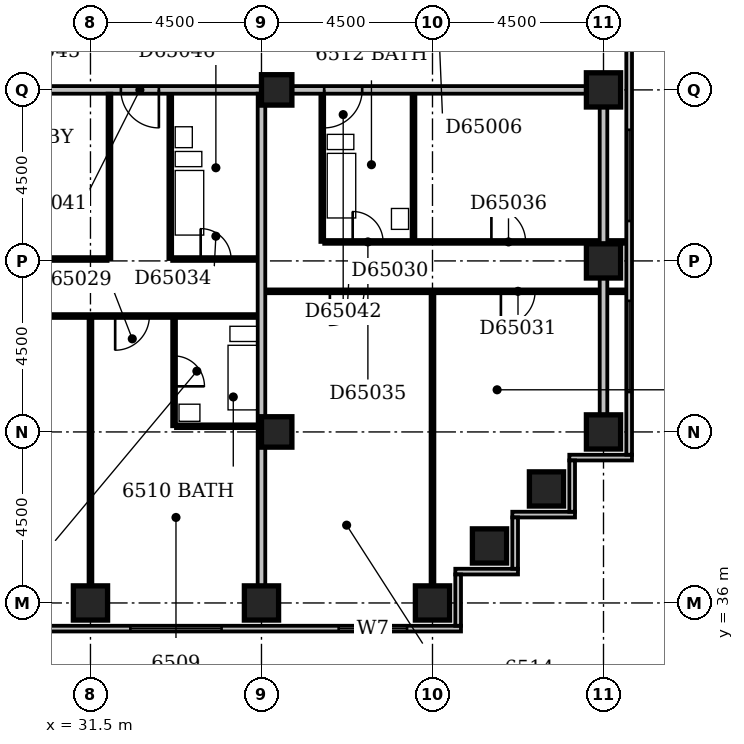
"""IFC4 building model, lengths in metres.
Left out: names, types, materials, properties, quantities, classifications, styles, units other than length and angle.
Written with IfcOpenShell. Run it as: python <this file> out.ifc"""

import sys

from ifc_helpers import new_model, si_unit, direction, frame, frame_2d, origin, origin_2d, place, context, subcontext, project, spatial, rectangle, extrude, element, fill, save


model = new_model("IFC4")
c1 = context("Model", 3, precision=1e-05, world=origin(), true_north=direction((0.0, 1.0)))
c2 = subcontext(c1, "Body", "Model", "MODEL_VIEW")
j1 = project(units=[si_unit("LENGTHUNIT", "METRE"), si_unit("PLANEANGLEUNIT", "RADIAN")], contexts=[c1])
p1 = place(None, origin())
s1 = spatial("IfcSite", under=j1, at=p1, CompositionType="ELEMENT")
p2 = place(p1, origin())
s2 = spatial("IfcBuilding", under=s1, at=p2, CompositionType="ELEMENT")
p3 = place(p2, frame((0.0, 0.0, 251.0)))
s3 = spatial("IfcBuildingStorey", under=s2, at=p3, CompositionType="ELEMENT", Elevation=251.0)
for number, where, z_axis, x_axis in (
    (1, (31.5, 36.0, -0.3), (0.0, 0.0, 1.0), (1.0, 0.0, 0.0)),
    (2, (36.0, 36.0, -0.3), (0.0, 0.0, 1.0), (1.0, 0.0, 0.0)),
    (3, (40.5, 36.0, -0.3), (0.0, 0.0, 1.0), (1.0, 0.0, 0.0)),
    (4, (42.0, 37.5, -0.3), (0.0, 0.0, 1.0), (1.0, 0.0, 0.0)),
    (5, (43.5, 39.0, -0.3), (0.0, 0.0, 1.0), (1.0, 0.0, 0.0)),
    (6, (45.0, 40.5, -0.3), (0.0, 0.0, 1.0), (1.0, 0.0, 0.0)),
    (7, (45.0, 45.0, -0.3), (0.0, 0.0, 1.0), (1.0, 0.0, 0.0)),
    (8, (45.0, 49.5, -0.3), (0.0, 0.0, 1.0), (1.0, 0.0, 0.0)),
):
    element("IfcColumn", number, at=place(p3, frame(where, z_axis=z_axis, x_axis=x_axis)), inside=s3, PredefinedType="COLUMN", context=c2, shape_type="SweptSolid", body=[
        extrude(rectangle(XDim=0.9, YDim=0.9, at=origin_2d()), origin(), (0.0, 0.0, 1.0), 3.6),
    ])
for number, where, z_axis, x_axis in (
    (9, (36.4, 40.5, -0.3), (0.0, 0.0, 1.0), (1.0, 0.0, 0.0)),
    (10, (36.4, 49.5, -0.3), (0.0, 0.0, 1.0), (1.0, 0.0, 0.0)),
):
    element("IfcColumn", number, at=place(p3, frame(where, z_axis=z_axis, x_axis=x_axis)), inside=s3, PredefinedType="COLUMN", context=c2, shape_type="SweptSolid", body=[
        extrude(rectangle(XDim=0.8, YDim=0.8, at=origin_2d()), origin(), (0.0, 0.0, 1.0), 3.6),
    ])
p4 = place(p3, frame((23.1, 35.325, 0.0), z_axis=(0.0, 0.0, 1.0), x_axis=(1.0, 0.0, 0.0)))
e11 = element("IfcWall", 11, at=p4, inside=s3, PredefinedType="STANDARD", context=c2, shape_type="SweptSolid", body=[
    extrude(rectangle(XDim=18.15, YDim=0.15, at=frame_2d((9.075, 0.0))), origin(), (0.0, 0.0, 1.0), 2.7),
])
p5 = place(p4, frame((0.45, 0.0, 0.6)))
e12 = element("IfcOpeningElement", 12, at=p5, cuts=e11, PredefinedType="OPENING", context=c2, shape_type="SweptSolid", body=[
    extrude(rectangle(XDim=2.4, YDim=1.8, at=frame_2d((1.2, 0.9))), frame((0.0, 0.087, 0.0), z_axis=(0.0, -1.0, 0.0), x_axis=(1.0, 0.0, 0.0)), (0.0, 0.0, 1.0), 0.174),
])
p6 = place(p4, frame((4.95, 0.0, 0.6)))
e13 = element("IfcOpeningElement", 13, at=p6, cuts=e11, PredefinedType="OPENING", context=c2, shape_type="SweptSolid", body=[
    extrude(rectangle(XDim=2.4, YDim=1.8, at=frame_2d((1.2, 0.9))), frame((0.0, 0.087, 0.0), z_axis=(0.0, -1.0, 0.0), x_axis=(1.0, 0.0, 0.0)), (0.0, 0.0, 1.0), 0.174),
])
p7 = place(p4, frame((9.45, 0.0, 0.6)))
e14 = element("IfcOpeningElement", 14, at=p7, cuts=e11, PredefinedType="OPENING", context=c2, shape_type="SweptSolid", body=[
    extrude(rectangle(XDim=2.4, YDim=1.8, at=frame_2d((1.2, 0.9))), frame((0.0, 0.087, 0.0), z_axis=(0.0, -1.0, 0.0), x_axis=(1.0, 0.0, 0.0)), (0.0, 0.0, 1.0), 0.174),
])
p8 = place(p4, frame((14.931, 0.0, 0.6)))
e15 = element("IfcOpeningElement", 15, at=p8, cuts=e11, PredefinedType="OPENING", context=c2, shape_type="SweptSolid", body=[
    extrude(rectangle(XDim=1.8, YDim=1.8, at=frame_2d((0.9, 0.9))), frame((0.0, 0.087, 0.0), z_axis=(0.0, -1.0, 0.0), x_axis=(1.0, 0.0, 0.0)), (0.0, 0.0, 1.0), 0.174),
])
p9 = place(p3, frame((41.175, 35.4, 0.0), z_axis=(0.0, 0.0, 1.0), x_axis=(0.0, 1.0, 0.0)))
e16 = element("IfcWall", 16, at=p9, inside=s3, PredefinedType="STANDARD", context=c2, shape_type="SweptSolid", body=[
    extrude(rectangle(XDim=1.35, YDim=0.15, at=frame_2d((0.675, 0.0))), origin(), (0.0, 0.0, 1.0), 2.7),
])
p10 = place(p3, frame((41.1, 36.825, 0.0), z_axis=(0.0, 0.0, 1.0), x_axis=(1.0, 0.0, 0.0)))
e17 = element("IfcWall", 17, at=p10, inside=s3, PredefinedType="STANDARD", context=c2, shape_type="SweptSolid", body=[
    extrude(rectangle(XDim=1.65, YDim=0.15, at=frame_2d((0.825, 0.0))), origin(), (0.0, 0.0, 1.0), 2.7),
])
p11 = place(p3, frame((42.675, 36.9, 0.0), z_axis=(0.0, 0.0, 1.0), x_axis=(0.0, 1.0, 0.0)))
e18 = element("IfcWall", 18, at=p11, inside=s3, PredefinedType="STANDARD", context=c2, shape_type="SweptSolid", body=[
    extrude(rectangle(XDim=1.35, YDim=0.15, at=frame_2d((0.675, 0.0))), origin(), (0.0, 0.0, 1.0), 2.7),
])
p12 = place(p3, frame((42.6, 38.325, 0.0), z_axis=(0.0, 0.0, 1.0), x_axis=(1.0, 0.0, 0.0)))
e19 = element("IfcWall", 19, at=p12, inside=s3, PredefinedType="STANDARD", context=c2, shape_type="SweptSolid", body=[
    extrude(rectangle(XDim=1.65, YDim=0.15, at=frame_2d((0.825, 0.0))), origin(), (0.0, 0.0, 1.0), 2.7),
])
p13 = place(p3, frame((44.175, 38.4, 0.0), z_axis=(0.0, 0.0, 1.0), x_axis=(0.0, 1.0, 0.0)))
e20 = element("IfcWall", 20, at=p13, inside=s3, PredefinedType="STANDARD", context=c2, shape_type="SweptSolid", body=[
    extrude(rectangle(XDim=1.35, YDim=0.15, at=frame_2d((0.675, 0.0))), origin(), (0.0, 0.0, 1.0), 2.7),
])
p14 = place(p3, frame((44.1, 39.825, 0.0), z_axis=(0.0, 0.0, 1.0), x_axis=(1.0, 0.0, 0.0)))
e21 = element("IfcWall", 21, at=p14, inside=s3, PredefinedType="STANDARD", context=c2, shape_type="SweptSolid", body=[
    extrude(rectangle(XDim=1.65, YDim=0.15, at=frame_2d((0.825, 0.0))), origin(), (0.0, 0.0, 1.0), 2.7),
])
p15 = place(p3, frame((45.675, 39.9, 0.0), z_axis=(0.0, 0.0, 1.0), x_axis=(0.0, 1.0, 0.0)))
e22 = element("IfcWall", 22, at=p15, inside=s3, PredefinedType="STANDARD", context=c2, shape_type="SweptSolid", body=[
    extrude(rectangle(XDim=19.35, YDim=0.15, at=frame_2d((9.675, 0.0))), origin(), (0.0, 0.0, 1.0), 2.7),
])
p16 = place(p15, frame((1.65, 0.0, 0.6)))
e23 = element("IfcOpeningElement", 23, at=p16, cuts=e22, PredefinedType="OPENING", context=c2, shape_type="SweptSolid", body=[
    extrude(rectangle(XDim=2.4, YDim=1.8, at=frame_2d((1.2, 0.9))), frame((0.0, 0.087, 0.0), z_axis=(0.0, -1.0, 0.0), x_axis=(1.0, 0.0, 0.0)), (0.0, 0.0, 1.0), 0.174),
])
p17 = place(p15, frame((6.15, 0.0, 0.6)))
e24 = element("IfcOpeningElement", 24, at=p17, cuts=e22, PredefinedType="OPENING", context=c2, shape_type="SweptSolid", body=[
    extrude(rectangle(XDim=2.4, YDim=1.8, at=frame_2d((1.2, 0.9))), frame((0.0, 0.087, 0.0), z_axis=(0.0, -1.0, 0.0), x_axis=(1.0, 0.0, 0.0)), (0.0, 0.0, 1.0), 0.174),
])
p18 = place(p3, frame((31.5, 36.45, 0.0), z_axis=(0.0, 0.0, 1.0), x_axis=(0.0, 1.0, 0.0)))
e25 = element("IfcWall", 25, at=p18, inside=s3, PredefinedType="PARTITIONING", context=c2, shape_type="SweptSolid", body=[
    extrude(rectangle(XDim=7.05, YDim=0.1, at=frame_2d((3.525, 0.0))), origin(), (0.0, 0.0, 1.0), 3.3),
])
p19 = place(p3, frame((36.0, 36.45, 0.0), z_axis=(0.0, 0.0, 1.0), x_axis=(0.0, 1.0, 0.0)))
e26 = element("IfcWall", 26, at=p19, inside=s3, PredefinedType="PARTITIONING", context=c2, shape_type="SweptSolid", body=[
    extrude(rectangle(XDim=12.95, YDim=0.2, at=frame_2d((6.475, 0.0))), origin(), (0.0, 0.0, 1.0), 3.3),
])
p20 = place(p3, frame((40.5, 36.45, 0.0), z_axis=(0.0, 0.0, 1.0), x_axis=(0.0, 1.0, 0.0)))
e27 = element("IfcWall", 27, at=p20, inside=s3, PredefinedType="PARTITIONING", context=c2, shape_type="SweptSolid", body=[
    extrude(rectangle(XDim=7.7, YDim=0.1, at=frame_2d((3.85, 0.0))), origin(), (0.0, 0.0, 1.0), 3.3),
])
p21 = place(p3, frame((33.7, 40.65, 0.0), z_axis=(0.0, 0.0, 1.0), x_axis=(0.0, 1.0, 0.0)))
e28 = element("IfcWall", 28, at=p21, inside=s3, PredefinedType="PLUMBINGWALL", context=c2, shape_type="SweptSolid", body=[
    extrude(rectangle(XDim=2.85, YDim=0.1, at=frame_2d((1.425, 0.0))), origin(), (0.0, 0.0, 1.0), 3.3),
])
p22 = place(p21, frame((1.05, 0.0, 0.0)))
e29 = element("IfcOpeningElement", 29, at=p22, cuts=e28, PredefinedType="OPENING", context=c2, shape_type="SweptSolid", body=[
    extrude(rectangle(XDim=0.8, YDim=2.1, at=frame_2d((0.4, 1.05))), frame((0.0, 0.062, 0.0), z_axis=(0.0, -1.0, 0.0), x_axis=(1.0, 0.0, 0.0)), (0.0, 0.0, 1.0), 0.124),
])
p23 = place(p3, frame((33.75, 40.65, 0.0), z_axis=(0.0, 0.0, 1.0), x_axis=(1.0, 0.0, 0.0)))
e30 = element("IfcWall", 30, at=p23, inside=s3, PredefinedType="PLUMBINGWALL", context=c2, shape_type="SweptSolid", body=[
    extrude(rectangle(XDim=2.15, YDim=0.1, at=frame_2d((1.075, 0.0))), origin(), (0.0, 0.0, 1.0), 3.3),
])
p24 = place(p3, frame((45.0, 40.95, 0.0), z_axis=(0.0, 0.0, 1.0), x_axis=(0.0, 1.0, 0.0)))
e31 = element("IfcWall", 31, at=p24, inside=s3, PredefinedType="PARTITIONING", context=c2, shape_type="SweptSolid", body=[
    extrude(rectangle(XDim=8.1, YDim=0.2, at=frame_2d((4.05, 0.0))), origin(), (0.0, 0.0, 1.0), 2.7),
])
p25 = place(p3, frame((27.1, 43.55, 0.0), z_axis=(0.0, 0.0, 1.0), x_axis=(1.0, 0.0, 0.0)))
e32 = element("IfcWall", 32, at=p25, inside=s3, PredefinedType="PARTITIONING", context=c2, shape_type="SweptSolid", body=[
    extrude(rectangle(XDim=8.8, YDim=0.1, at=frame_2d((4.4, 0.0))), origin(), (0.0, 0.0, 1.0), 3.3),
])
p26 = place(p25, frame((1.7, 0.0, 0.0)))
e33 = element("IfcOpeningElement", 33, at=p26, cuts=e32, PredefinedType="OPENING", context=c2, shape_type="SweptSolid", body=[
    extrude(rectangle(XDim=0.9, YDim=2.1, at=frame_2d((0.45, 1.05))), frame((0.0, 0.062, 0.0), z_axis=(0.0, -1.0, 0.0), x_axis=(1.0, 0.0, 0.0)), (0.0, 0.0, 1.0), 0.124),
])
p27 = place(p25, frame((5.05, 0.0, 0.0)))
e34 = element("IfcOpeningElement", 34, at=p27, cuts=e32, PredefinedType="OPENING", context=c2, shape_type="SweptSolid", body=[
    extrude(rectangle(XDim=0.9, YDim=2.1, at=frame_2d((0.45, 1.05))), frame((0.0, 0.062, 0.0), z_axis=(0.0, -1.0, 0.0), x_axis=(1.0, 0.0, 0.0)), (0.0, 0.0, 1.0), 0.124),
])
p28 = place(p3, frame((36.1, 44.2, 0.0), z_axis=(0.0, 0.0, 1.0), x_axis=(1.0, 0.0, 0.0)))
e35 = element("IfcWall", 35, at=p28, inside=s3, PredefinedType="PARTITIONING", context=c2, shape_type="SweptSolid", body=[
    extrude(rectangle(XDim=9.5, YDim=0.1, at=frame_2d((4.75, 0.0))), origin(), (0.0, 0.0, 1.0), 3.3),
])
p29 = place(p28, frame((1.7, 0.0, 0.0)))
e36 = element("IfcOpeningElement", 36, at=p29, cuts=e35, PredefinedType="OPENING", context=c2, shape_type="SweptSolid", body=[
    extrude(rectangle(XDim=0.9, YDim=2.1, at=frame_2d((0.45, 1.05))), frame((0.0, 0.062, 0.0), z_axis=(0.0, -1.0, 0.0), x_axis=(1.0, 0.0, 0.0)), (0.0, 0.0, 1.0), 0.124),
])
p30 = place(p28, frame((6.2, 0.0, 0.0)))
e37 = element("IfcOpeningElement", 37, at=p30, cuts=e35, PredefinedType="OPENING", context=c2, shape_type="SweptSolid", body=[
    extrude(rectangle(XDim=0.9, YDim=2.1, at=frame_2d((0.45, 1.05))), frame((0.0, 0.062, 0.0), z_axis=(0.0, -1.0, 0.0), x_axis=(1.0, 0.0, 0.0)), (0.0, 0.0, 1.0), 0.124),
])
p31 = place(p3, frame((27.1, 45.05, 0.0), z_axis=(0.0, 0.0, 1.0), x_axis=(1.0, 0.0, 0.0)))
e38 = element("IfcWall", 38, at=p31, inside=s3, PredefinedType="PARTITIONING", context=c2, shape_type="SweptSolid", body=[
    extrude(rectangle(XDim=4.85, YDim=0.1, at=frame_2d((2.425, 0.0))), origin(), (0.0, 0.0, 1.0), 3.3),
])
p32 = place(p31, frame((1.95, 0.0, 0.0)))
e39 = element("IfcOpeningElement", 39, at=p32, cuts=e38, PredefinedType="OPENING", context=c2, shape_type="SweptSolid", body=[
    extrude(rectangle(XDim=0.9, YDim=2.1, at=frame_2d((0.45, 1.05))), frame((0.0, 0.062, 0.0), z_axis=(0.0, -1.0, 0.0), x_axis=(1.0, 0.0, 0.0)), (0.0, 0.0, 1.0), 0.124),
])
p33 = place(p3, frame((32.0, 45.05, 0.0), z_axis=(0.0, 0.0, 1.0), x_axis=(0.0, 1.0, 0.0)))
e40 = element("IfcWall", 40, at=p33, inside=s3, PredefinedType="PARTITIONING", context=c2, shape_type="SweptSolid", body=[
    extrude(rectangle(XDim=4.35, YDim=0.1, at=frame_2d((2.175, 0.0))), origin(), (0.0, 0.0, 1.0), 3.3),
])
p34 = place(p3, frame((33.6, 45.05, 0.0), z_axis=(0.0, 0.0, 1.0), x_axis=(0.0, 1.0, 0.0)))
e41 = element("IfcWall", 41, at=p34, inside=s3, PredefinedType="PLUMBINGWALL", context=c2, shape_type="SweptSolid", body=[
    extrude(rectangle(XDim=4.35, YDim=0.1, at=frame_2d((2.175, 0.0))), origin(), (0.0, 0.0, 1.0), 3.3),
])
p35 = place(p3, frame((33.65, 45.05, 0.0), z_axis=(0.0, 0.0, 1.0), x_axis=(1.0, 0.0, 0.0)))
e42 = element("IfcWall", 42, at=p35, inside=s3, PredefinedType="PARTITIONING", context=c2, shape_type="SweptSolid", body=[
    extrude(rectangle(XDim=2.25, YDim=0.1, at=frame_2d((1.125, 0.0))), origin(), (0.0, 0.0, 1.0), 3.3),
])
p36 = place(p35, frame((0.75, 0.0, 0.0)))
e43 = element("IfcOpeningElement", 43, at=p36, cuts=e42, PredefinedType="OPENING", context=c2, shape_type="SweptSolid", body=[
    extrude(rectangle(XDim=0.8, YDim=2.1, at=frame_2d((0.4, 1.05))), frame((0.0, 0.062, 0.0), z_axis=(0.0, -1.0, 0.0), x_axis=(1.0, 0.0, 0.0)), (0.0, 0.0, 1.0), 0.124),
])
p37 = place(p3, frame((37.6, 45.5, 0.0), z_axis=(0.0, 0.0, 1.0), x_axis=(0.0, 1.0, 0.0)))
e44 = element("IfcWall", 44, at=p37, inside=s3, PredefinedType="PLUMBINGWALL", context=c2, shape_type="SweptSolid", body=[
    extrude(rectangle(XDim=3.9, YDim=0.1, at=frame_2d((1.95, 0.0))), origin(), (0.0, 0.0, 1.0), 3.3),
])
p38 = place(p3, frame((37.65, 45.5, 0.0), z_axis=(0.0, 0.0, 1.0), x_axis=(1.0, 0.0, 0.0)))
e45 = element("IfcWall", 45, at=p38, inside=s3, PredefinedType="PARTITIONING", context=c2, shape_type="SweptSolid", body=[
    extrude(rectangle(XDim=7.95, YDim=0.1, at=frame_2d((3.975, 0.0))), origin(), (0.0, 0.0, 1.0), 3.3),
])
p39 = place(p38, frame((0.75, 0.0, 0.0)))
e46 = element("IfcOpeningElement", 46, at=p39, cuts=e45, PredefinedType="OPENING", context=c2, shape_type="SweptSolid", body=[
    extrude(rectangle(XDim=0.8, YDim=2.1, at=frame_2d((0.4, 1.05))), frame((0.0, 0.062, 0.0), z_axis=(0.0, -1.0, 0.0), x_axis=(1.0, 0.0, 0.0)), (0.0, 0.0, 1.0), 0.124),
])
p40 = place(p38, frame((4.4, 0.0, 0.0)))
e47 = element("IfcOpeningElement", 47, at=p40, cuts=e45, PredefinedType="OPENING", context=c2, shape_type="SweptSolid", body=[
    extrude(rectangle(XDim=0.9, YDim=2.1, at=frame_2d((0.45, 1.05))), frame((0.0, 0.062, 0.0), z_axis=(0.0, -1.0, 0.0), x_axis=(1.0, 0.0, 0.0)), (0.0, 0.0, 1.0), 0.124),
])
p41 = place(p3, frame((40.0, 45.55, 0.0), z_axis=(0.0, 0.0, 1.0), x_axis=(0.0, 1.0, 0.0)))
e48 = element("IfcWall", 48, at=p41, inside=s3, PredefinedType="PLUMBINGWALL", context=c2, shape_type="SweptSolid", body=[
    extrude(rectangle(XDim=3.85, YDim=0.1, at=frame_2d((1.925, 0.0))), origin(), (0.0, 0.0, 1.0), 3.3),
])
p42 = place(p3, frame((22.6, 49.5, 0.0), z_axis=(0.0, 0.0, 1.0), x_axis=(1.0, 0.0, 0.0)))
e49 = element("IfcWall", 49, at=p42, inside=s3, PredefinedType="PARTITIONING", context=c2, shape_type="SweptSolid", body=[
    extrude(rectangle(XDim=21.95, YDim=0.2, at=frame_2d((10.975, 0.0))), origin(), (0.0, 0.0, 1.0), 3.3),
])
p43 = place(p42, frame((1.85, 0.0, 0.0)))
e50 = element("IfcOpeningElement", 50, at=p43, cuts=e49, PredefinedType="OPENING", context=c2, shape_type="SweptSolid", body=[
    extrude(rectangle(XDim=1.0, YDim=2.1, at=frame_2d((0.5, 1.05))), frame((0.0, 0.112, 0.0), z_axis=(0.0, -1.0, 0.0), x_axis=(1.0, 0.0, 0.0)), (0.0, 0.0, 1.0), 0.224),
])
p44 = place(p42, frame((9.7, 0.0, 0.0)))
e51 = element("IfcOpeningElement", 51, at=p44, cuts=e49, PredefinedType="OPENING", context=c2, shape_type="SweptSolid", body=[
    extrude(rectangle(XDim=1.0, YDim=2.1, at=frame_2d((0.5, 1.05))), frame((0.0, 0.112, 0.0), z_axis=(0.0, -1.0, 0.0), x_axis=(1.0, 0.0, 0.0)), (0.0, 0.0, 1.0), 0.224),
])
p45 = place(p42, frame((15.05, 0.0, 0.0)))
e52 = element("IfcOpeningElement", 52, at=p45, cuts=e49, PredefinedType="OPENING", context=c2, shape_type="SweptSolid", body=[
    extrude(rectangle(XDim=1.0, YDim=2.1, at=frame_2d((0.5, 1.05))), frame((0.0, 0.112, 0.0), z_axis=(0.0, -1.0, 0.0), x_axis=(1.0, 0.0, 0.0)), (0.0, 0.0, 1.0), 0.224),
])
p46 = place(p7, origin())
e53 = element("IfcWindow", 53, at=p46, inside=s3, PartitioningType="SINGLE_PANEL", PredefinedType="WINDOW", context=c2, shape_type="SweptSolid", body=[
    extrude(rectangle(XDim=2.4, YDim=1.8, at=frame_2d((1.2, 0.9))), frame((0.0, 0.03, 0.0), z_axis=(0.0, -1.0, 0.0), x_axis=(1.0, 0.0, 0.0)), (0.0, 0.0, 1.0), 0.06),
])
fill(e14, e53)
p47 = place(p8, origin())
e54 = element("IfcWindow", 54, at=p47, inside=s3, PartitioningType="SINGLE_PANEL", PredefinedType="WINDOW", context=c2, shape_type="SweptSolid", body=[
    extrude(rectangle(XDim=1.8, YDim=1.8, at=frame_2d((0.9, 0.9))), frame((0.0, 0.03, 0.0), z_axis=(0.0, -1.0, 0.0), x_axis=(1.0, 0.0, 0.0)), (0.0, 0.0, 1.0), 0.06),
])
fill(e15, e54)
p48 = place(p16, origin())
e55 = element("IfcWindow", 55, at=p48, inside=s3, PartitioningType="SINGLE_PANEL", PredefinedType="WINDOW", context=c2, shape_type="SweptSolid", body=[
    extrude(rectangle(XDim=2.4, YDim=1.8, at=frame_2d((1.2, 0.9))), frame((0.0, 0.03, 0.0), z_axis=(0.0, -1.0, 0.0), x_axis=(1.0, 0.0, 0.0)), (0.0, 0.0, 1.0), 0.06),
])
fill(e23, e55)
p49 = place(p17, origin())
e56 = element("IfcWindow", 56, at=p49, inside=s3, PartitioningType="SINGLE_PANEL", PredefinedType="WINDOW", context=c2, shape_type="SweptSolid", body=[
    extrude(rectangle(XDim=2.4, YDim=1.8, at=frame_2d((1.2, 0.9))), frame((0.0, 0.03, 0.0), z_axis=(0.0, -1.0, 0.0), x_axis=(1.0, 0.0, 0.0)), (0.0, 0.0, 1.0), 0.06),
])
fill(e24, e56)
p50 = place(p22, frame((0.8, 0.0, 0.0), z_axis=(0.0, 0.0, 1.0), x_axis=(-1.0, 0.0, 0.0)))
e57 = element("IfcDoor", 57, at=p50, inside=s3, OperationType="SINGLE_SWING_RIGHT", PredefinedType="DOOR", context=c2, shape_type="SweptSolid", body=[
    extrude(rectangle(XDim=0.8, YDim=2.1, at=frame_2d((0.4, 1.05))), frame((0.0, 0.025, 0.0), z_axis=(0.0, -1.0, 0.0), x_axis=(1.0, 0.0, 0.0)), (0.0, 0.0, 1.0), 0.05),
])
fill(e29, e57)
p51 = place(p27, frame((0.9, 0.0, 0.0), z_axis=(0.0, 0.0, 1.0), x_axis=(-1.0, 0.0, 0.0)))
e58 = element("IfcDoor", 58, at=p51, inside=s3, OperationType="SINGLE_SWING_RIGHT", PredefinedType="DOOR", context=c2, shape_type="SweptSolid", body=[
    extrude(rectangle(XDim=0.9, YDim=2.1, at=frame_2d((0.45, 1.05))), frame((0.0, 0.025, 0.0), z_axis=(0.0, -1.0, 0.0), x_axis=(1.0, 0.0, 0.0)), (0.0, 0.0, 1.0), 0.05),
])
fill(e34, e58)
p52 = place(p29, frame((0.9, 0.0, 0.0), z_axis=(0.0, 0.0, 1.0), x_axis=(-1.0, 0.0, 0.0)))
e59 = element("IfcDoor", 59, at=p52, inside=s3, OperationType="SINGLE_SWING_RIGHT", PredefinedType="DOOR", context=c2, shape_type="SweptSolid", body=[
    extrude(rectangle(XDim=0.9, YDim=2.1, at=frame_2d((0.45, 1.05))), frame((0.0, 0.025, 0.0), z_axis=(0.0, -1.0, 0.0), x_axis=(1.0, 0.0, 0.0)), (0.0, 0.0, 1.0), 0.05),
])
fill(e36, e59)
p53 = place(p30, frame((0.9, 0.0, 0.0), z_axis=(0.0, 0.0, 1.0), x_axis=(-1.0, 0.0, 0.0)))
e60 = element("IfcDoor", 60, at=p53, inside=s3, OperationType="SINGLE_SWING_RIGHT", PredefinedType="DOOR", context=c2, shape_type="SweptSolid", body=[
    extrude(rectangle(XDim=0.9, YDim=2.1, at=frame_2d((0.45, 1.05))), frame((0.0, 0.025, 0.0), z_axis=(0.0, -1.0, 0.0), x_axis=(1.0, 0.0, 0.0)), (0.0, 0.0, 1.0), 0.05),
])
fill(e37, e60)
p54 = place(p36, origin())
e61 = element("IfcDoor", 61, at=p54, inside=s3, OperationType="SINGLE_SWING_LEFT", PredefinedType="DOOR", context=c2, shape_type="SweptSolid", body=[
    extrude(rectangle(XDim=0.8, YDim=2.1, at=frame_2d((0.4, 1.05))), frame((0.0, 0.025, 0.0), z_axis=(0.0, -1.0, 0.0), x_axis=(1.0, 0.0, 0.0)), (0.0, 0.0, 1.0), 0.05),
])
fill(e43, e61)
p55 = place(p39, origin())
e62 = element("IfcDoor", 62, at=p55, inside=s3, OperationType="SINGLE_SWING_LEFT", PredefinedType="DOOR", context=c2, shape_type="SweptSolid", body=[
    extrude(rectangle(XDim=0.8, YDim=2.1, at=frame_2d((0.4, 1.05))), frame((0.0, 0.025, 0.0), z_axis=(0.0, -1.0, 0.0), x_axis=(1.0, 0.0, 0.0)), (0.0, 0.0, 1.0), 0.05),
])
fill(e46, e62)
p56 = place(p40, origin())
e63 = element("IfcDoor", 63, at=p56, inside=s3, OperationType="SINGLE_SWING_LEFT", PredefinedType="DOOR", context=c2, shape_type="SweptSolid", body=[
    extrude(rectangle(XDim=0.9, YDim=2.1, at=frame_2d((0.45, 1.05))), frame((0.0, 0.025, 0.0), z_axis=(0.0, -1.0, 0.0), x_axis=(1.0, 0.0, 0.0)), (0.0, 0.0, 1.0), 0.05),
])
fill(e47, e63)
p57 = place(p44, origin())
e64 = element("IfcDoor", 64, at=p57, inside=s3, OperationType="SINGLE_SWING_RIGHT", PredefinedType="DOOR", context=c2, shape_type="SweptSolid", body=[
    extrude(rectangle(XDim=1.0, YDim=2.1, at=frame_2d((0.5, 1.05))), frame((0.0, 0.025, 0.0), z_axis=(0.0, -1.0, 0.0), x_axis=(1.0, 0.0, 0.0)), (0.0, 0.0, 1.0), 0.05),
])
fill(e51, e64)
p58 = place(p45, frame((1.0, 0.0, 0.0), z_axis=(0.0, 0.0, 1.0), x_axis=(-1.0, 0.0, 0.0)))
e65 = element("IfcDoor", 65, at=p58, inside=s3, OperationType="SINGLE_SWING_RIGHT", PredefinedType="DOOR", context=c2, shape_type="SweptSolid", body=[
    extrude(rectangle(XDim=1.0, YDim=2.1, at=frame_2d((0.5, 1.05))), frame((0.0, 0.025, 0.0), z_axis=(0.0, -1.0, 0.0), x_axis=(1.0, 0.0, 0.0)), (0.0, 0.0, 1.0), 0.05),
])
fill(e52, e65)
save(model, sys.argv[1])
